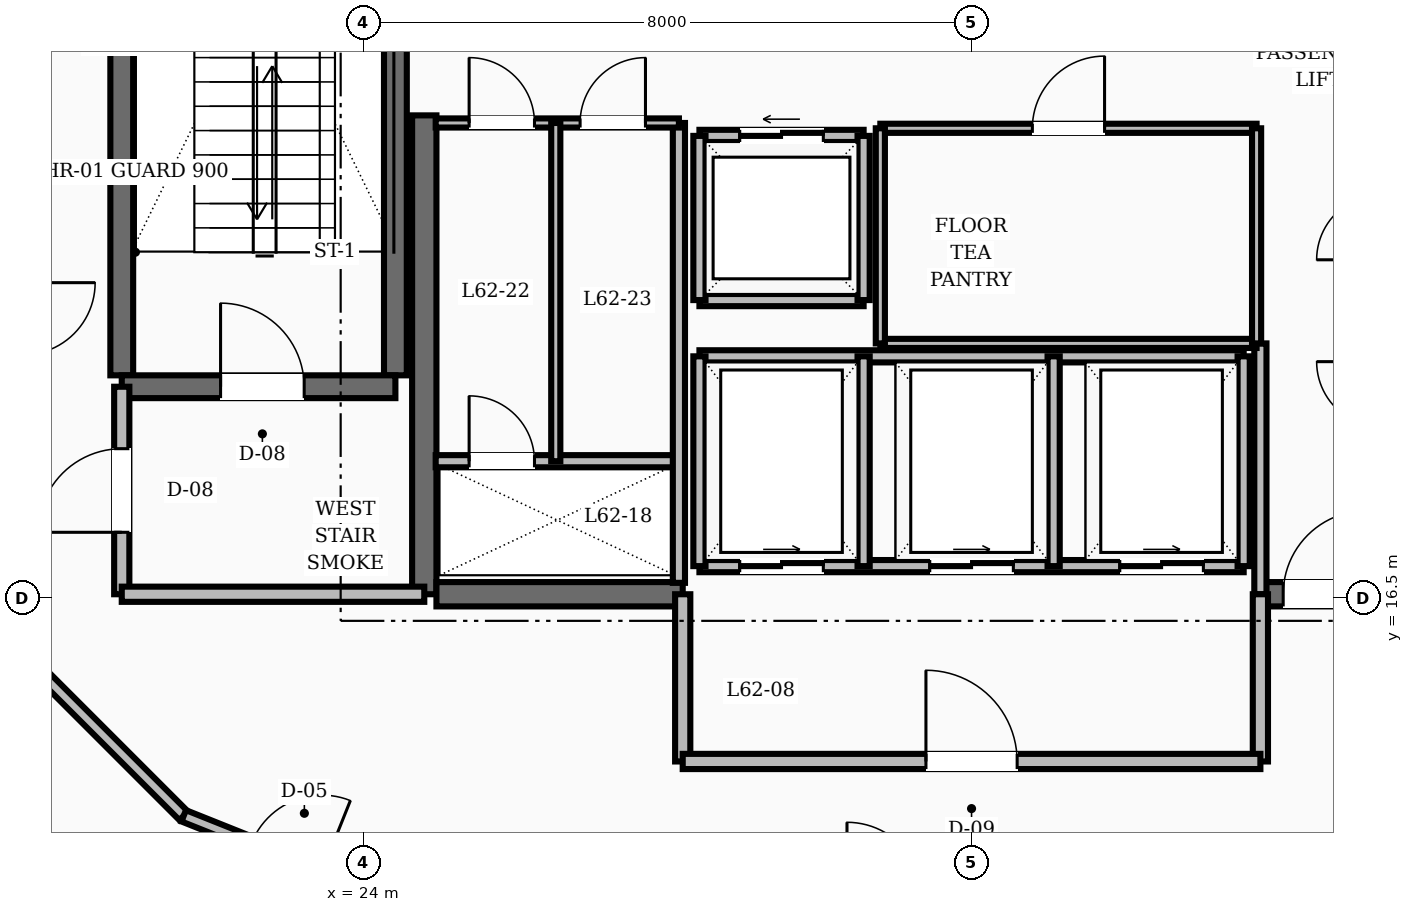
"""IFC4 building model, lengths in metres.
Left out: names, types, materials, properties, quantities, classifications, styles, units other than length and angle.
Written with IfcOpenShell. Run it as: python <this file> out.ifc"""

import sys

from ifc_helpers import new_model, si_unit, direction, frame, frame_2d, origin, place, context, subcontext, project, spatial, rectangle, extrude, element, fill, save


model = new_model("IFC4")
c1 = context("Model", 3, precision=1e-05, world=origin(), true_north=direction((0.0, 1.0)))
c2 = subcontext(c1, "Body", "Model", "MODEL_VIEW")
j1 = project(units=[si_unit("LENGTHUNIT", "METRE"), si_unit("PLANEANGLEUNIT", "RADIAN")], contexts=[c1])
p1 = place(None, origin())
s1 = spatial("IfcSite", under=j1, at=p1, CompositionType="ELEMENT")
p2 = place(p1, origin())
s2 = spatial("IfcBuilding", under=s1, at=p2, CompositionType="ELEMENT")
p3 = place(p2, frame((0.0, 0.0, 240.0)))
s3 = spatial("IfcBuildingStorey", under=s2, at=p3, CompositionType="ELEMENT", Elevation=240.0)
p4 = place(p3, frame((24.8, 16.55, 0.0), z_axis=(0.0, 0.0, 1.0), x_axis=(0.0, 1.0, 0.0)))
e1 = element("IfcWall", 1, at=p4, inside=s3, PredefinedType="SHEAR", context=c2, shape_type="SweptSolid", body=[
    extrude(rectangle(XDim=6.3, YDim=0.32, at=frame_2d((3.15, 0.0))), origin(), (0.0, 0.0, 1.0), 3.6),
])
p5 = place(p3, frame((24.96, 16.55, 0.0), z_axis=(0.0, 0.0, 1.0), x_axis=(1.0, 0.0, 0.0)))
e2 = element("IfcWall", 2, at=p5, inside=s3, PredefinedType="SHEAR", context=c2, shape_type="SweptSolid", body=[
    extrude(rectangle(XDim=3.24, YDim=0.32, at=frame_2d((1.62, 0.0))), origin(), (0.0, 0.0, 1.0), 3.6),
])
p6 = place(p3, frame((35.8, 16.55, 0.0), z_axis=(0.0, 0.0, 1.0), x_axis=(1.0, 0.0, 0.0)))
e3 = element("IfcWall", 3, at=p6, inside=s3, PredefinedType="SHEAR", context=c2, shape_type="SweptSolid", body=[
    extrude(rectangle(XDim=3.24, YDim=0.32, at=frame_2d((1.62, 0.0))), origin(), (0.0, 0.0, 1.0), 3.6),
])
p7 = place(p6, frame((0.3, 0.0, 0.0)))
e4 = element("IfcOpeningElement", 4, at=p7, cuts=e3, PredefinedType="OPENING", context=c2, shape_type="SweptSolid", body=[
    extrude(rectangle(XDim=1.1, YDim=2.1, at=frame_2d((0.55, 1.05))), frame((0.0, 0.17, 0.0), z_axis=(0.0, -1.0, 0.0), x_axis=(1.0, 0.0, 0.0)), (0.0, 0.0, 1.0), 0.34),
])
for number, where, z_axis, x_axis in (
    (5, (20.82, 19.43, 0.0), (0.0, 0.0, 1.0), (0.0, 1.0, 0.0)),
    (6, (24.42, 19.43, 0.0), (0.0, 0.0, 1.0), (0.0, 1.0, 0.0)),
):
    element("IfcWall", number, at=place(p3, frame(where, z_axis=z_axis, x_axis=x_axis)), inside=s3, PredefinedType="SHEAR", context=c2, shape_type="SweptSolid", body=[
        extrude(rectangle(XDim=8.74, YDim=0.3, at=frame_2d((4.37, 0.0))), origin(), (0.0, 0.0, 1.0), 3.6),
    ])
p8 = place(p3, frame((20.82, 19.28, 0.0), z_axis=(0.0, 0.0, 1.0), x_axis=(1.0, 0.0, 0.0)))
e7 = element("IfcWall", 7, at=p8, inside=s3, PredefinedType="SHEAR", context=c2, shape_type="SweptSolid", body=[
    extrude(rectangle(XDim=3.6, YDim=0.3, at=frame_2d((1.8, 0.0))), origin(), (0.0, 0.0, 1.0), 3.6),
])
p9 = place(p8, frame((1.3, 0.0, 0.0)))
e8 = element("IfcOpeningElement", 8, at=p9, cuts=e7, PredefinedType="OPENING", context=c2, shape_type="SweptSolid", body=[
    extrude(rectangle(XDim=1.1, YDim=2.1, at=frame_2d((0.55, 1.05))), frame((0.0, 0.16, 0.0), z_axis=(0.0, -1.0, 0.0), x_axis=(1.0, 0.0, 0.0)), (0.0, 0.0, 1.0), 0.32),
])
p10 = place(p3, frame((20.82, 16.55, 0.0), z_axis=(0.0, 0.0, 1.0), x_axis=(0.0, 1.0, 0.0)))
e9 = element("IfcWall", 9, at=p10, inside=s3, PredefinedType="SOLIDWALL", context=c2, shape_type="SweptSolid", body=[
    extrude(rectangle(XDim=2.73, YDim=0.2, at=frame_2d((1.365, 0.0))), origin(), (0.0, 0.0, 1.0), 2.87),
])
p11 = place(p10, frame((0.815, 0.0, 0.0)))
e10 = element("IfcOpeningElement", 10, at=p11, cuts=e9, PredefinedType="OPENING", context=c2, shape_type="SweptSolid", body=[
    extrude(rectangle(XDim=1.1, YDim=2.1, at=frame_2d((0.55, 1.05))), frame((0.0, 0.11, 0.0), z_axis=(0.0, -1.0, 0.0), x_axis=(1.0, 0.0, 0.0)), (0.0, 0.0, 1.0), 0.22),
])
p12 = place(p3, frame((20.82, 16.55, 0.0), z_axis=(0.0, 0.0, 1.0), x_axis=(1.0, 0.0, 0.0)))
e11 = element("IfcWall", 11, at=p12, inside=s3, PredefinedType="SOLIDWALL", context=c2, shape_type="SweptSolid", body=[
    extrude(rectangle(XDim=3.98, YDim=0.2, at=frame_2d((1.99, 0.0))), origin(), (0.0, 0.0, 1.0), 2.87),
])
p13 = place(p3, frame((35.8, 16.55, 0.0), z_axis=(0.0, 0.0, 1.0), x_axis=(0.0, 1.0, 0.0)))
e12 = element("IfcWall", 12, at=p13, inside=s3, PredefinedType="SOLIDWALL", context=c2, shape_type="SweptSolid", body=[
    extrude(rectangle(XDim=3.3, YDim=0.16, at=frame_2d((1.65, 0.0))), origin(), (0.0, 0.0, 1.0), 2.87),
])
for number, where, z_axis, x_axis in (
    (13, (28.2, 14.35, 0.0), (0.0, 0.0, 1.0), (0.0, 1.0, 0.0)),
    (14, (35.8, 14.35, 0.0), (0.0, 0.0, 1.0), (0.0, 1.0, 0.0)),
):
    element("IfcWall", number, at=place(p3, frame(where, z_axis=z_axis, x_axis=x_axis)), inside=s3, PredefinedType="SOLIDWALL", context=c2, shape_type="SweptSolid", body=[
        extrude(rectangle(XDim=2.2, YDim=0.2, at=frame_2d((1.1, 0.0))), origin(), (0.0, 0.0, 1.0), 2.87),
    ])
p14 = place(p3, frame((28.2, 14.35, 0.0), z_axis=(0.0, 0.0, 1.0), x_axis=(1.0, 0.0, 0.0)))
e15 = element("IfcWall", 15, at=p14, inside=s3, PredefinedType="SOLIDWALL", context=c2, shape_type="SweptSolid", body=[
    extrude(rectangle(XDim=7.6, YDim=0.2, at=frame_2d((3.8, 0.0))), origin(), (0.0, 0.0, 1.0), 2.87),
])
p15 = place(p14, frame((3.2, 0.0, 0.0)))
e16 = element("IfcOpeningElement", 16, at=p15, cuts=e15, PredefinedType="OPENING", context=c2, shape_type="SweptSolid", body=[
    extrude(rectangle(XDim=1.2, YDim=2.1, at=frame_2d((0.6, 1.05))), frame((0.0, 0.11, 0.0), z_axis=(0.0, -1.0, 0.0), x_axis=(1.0, 0.0, 0.0)), (0.0, 0.0, 1.0), 0.22),
])
p16 = place(p3, frame((28.42, 22.58, 0.0), z_axis=(0.0, 0.0, 1.0), x_axis=(1.0, 0.0, 0.0)))
e17 = element("IfcWall", 17, at=p16, inside=s3, PredefinedType="SOLIDWALL", context=c2, shape_type="SweptSolid", body=[
    extrude(rectangle(XDim=2.16, YDim=0.16, at=frame_2d((1.08, 0.0))), origin(), (0.0, 0.0, 1.0), 2.87),
])
p17 = place(p16, frame((0.53, 0.0, 0.0)))
e18 = element("IfcOpeningElement", 18, at=p17, cuts=e17, PredefinedType="OPENING", context=c2, shape_type="SweptSolid", body=[
    extrude(rectangle(XDim=1.1, YDim=2.15, at=frame_2d((0.55, 1.075))), frame((0.0, 0.09, 0.0), z_axis=(0.0, -1.0, 0.0), x_axis=(1.0, 0.0, 0.0)), (0.0, 0.0, 1.0), 0.18),
])
for number, where, z_axis, x_axis in (
    (19, (28.42, 20.42, 0.0), (0.0, 0.0, 1.0), (1.0, 0.0, 0.0)),
    (20, (28.42, 20.42, 0.0), (0.0, 0.0, 1.0), (0.0, 1.0, 0.0)),
    (21, (30.58, 20.42, 0.0), (0.0, 0.0, 1.0), (0.0, 1.0, 0.0)),
):
    element("IfcWall", number, at=place(p3, frame(where, z_axis=z_axis, x_axis=x_axis)), inside=s3, PredefinedType="SOLIDWALL", context=c2, shape_type="SweptSolid", body=[
        extrude(rectangle(XDim=2.16, YDim=0.16, at=frame_2d((1.08, 0.0))), origin(), (0.0, 0.0, 1.0), 2.87),
    ])
p18 = place(p3, frame((28.42, 16.92, 0.0), z_axis=(0.0, 0.0, 1.0), x_axis=(1.0, 0.0, 0.0)))
e22 = element("IfcWall", 22, at=p18, inside=s3, PredefinedType="SOLIDWALL", context=c2, shape_type="SweptSolid", body=[
    extrude(rectangle(XDim=7.16, YDim=0.16, at=frame_2d((3.58, 0.0))), origin(), (0.0, 0.0, 1.0), 2.87),
])
p19 = place(p18, frame((0.53, 0.0, 0.0)))
e23 = element("IfcOpeningElement", 23, at=p19, cuts=e22, PredefinedType="OPENING", context=c2, shape_type="SweptSolid", body=[
    extrude(rectangle(XDim=1.1, YDim=2.15, at=frame_2d((0.55, 1.075))), frame((0.0, 0.09, 0.0), z_axis=(0.0, -1.0, 0.0), x_axis=(1.0, 0.0, 0.0)), (0.0, 0.0, 1.0), 0.18),
])
p20 = place(p18, frame((3.03, 0.0, 0.0)))
e24 = element("IfcOpeningElement", 24, at=p20, cuts=e22, PredefinedType="OPENING", context=c2, shape_type="SweptSolid", body=[
    extrude(rectangle(XDim=1.1, YDim=2.15, at=frame_2d((0.55, 1.075))), frame((0.0, 0.09, 0.0), z_axis=(0.0, -1.0, 0.0), x_axis=(1.0, 0.0, 0.0)), (0.0, 0.0, 1.0), 0.18),
])
p21 = place(p18, frame((5.53, 0.0, 0.0)))
e25 = element("IfcOpeningElement", 25, at=p21, cuts=e22, PredefinedType="OPENING", context=c2, shape_type="SweptSolid", body=[
    extrude(rectangle(XDim=1.1, YDim=2.15, at=frame_2d((0.55, 1.075))), frame((0.0, 0.09, 0.0), z_axis=(0.0, -1.0, 0.0), x_axis=(1.0, 0.0, 0.0)), (0.0, 0.0, 1.0), 0.18),
])
p22 = place(p3, frame((28.42, 19.68, 0.0), z_axis=(0.0, 0.0, 1.0), x_axis=(1.0, 0.0, 0.0)))
e26 = element("IfcWall", 26, at=p22, inside=s3, PredefinedType="SOLIDWALL", context=c2, shape_type="SweptSolid", body=[
    extrude(rectangle(XDim=7.16, YDim=0.16, at=frame_2d((3.58, 0.0))), origin(), (0.0, 0.0, 1.0), 2.87),
])
for number, where, z_axis, x_axis in (
    (27, (28.42, 16.92, 0.0), (0.0, 0.0, 1.0), (0.0, 1.0, 0.0)),
    (28, (30.58, 16.92, 0.0), (0.0, 0.0, 1.0), (0.0, 1.0, 0.0)),
    (29, (33.08, 16.92, 0.0), (0.0, 0.0, 1.0), (0.0, 1.0, 0.0)),
    (30, (35.58, 16.92, 0.0), (0.0, 0.0, 1.0), (0.0, 1.0, 0.0)),
):
    element("IfcWall", number, at=place(p3, frame(where, z_axis=z_axis, x_axis=x_axis)), inside=s3, PredefinedType="SOLIDWALL", context=c2, shape_type="SweptSolid", body=[
        extrude(rectangle(XDim=2.76, YDim=0.16, at=frame_2d((1.38, 0.0))), origin(), (0.0, 0.0, 1.0), 2.87),
    ])
p23 = place(p3, frame((30.8, 22.68, 0.0), z_axis=(0.0, 0.0, 1.0), x_axis=(1.0, 0.0, 0.0)))
e31 = element("IfcWall", 31, at=p23, inside=s3, PredefinedType="PARTITIONING", context=c2, shape_type="SweptSolid", body=[
    extrude(rectangle(XDim=4.95, YDim=0.12, at=frame_2d((2.475, 0.0))), origin(), (0.0, 0.0, 1.0), 2.87),
])
p24 = place(p23, frame((2.0, 0.0, 0.0)))
e32 = element("IfcOpeningElement", 32, at=p24, cuts=e31, PredefinedType="OPENING", context=c2, shape_type="SweptSolid", body=[
    extrude(rectangle(XDim=0.95, YDim=2.1, at=frame_2d((0.475, 1.05))), frame((0.0, 0.07, 0.0), z_axis=(0.0, -1.0, 0.0), x_axis=(1.0, 0.0, 0.0)), (0.0, 0.0, 1.0), 0.14),
])
p25 = place(p3, frame((30.8, 19.85, 0.0), z_axis=(0.0, 0.0, 1.0), x_axis=(1.0, 0.0, 0.0)))
e33 = element("IfcWall", 33, at=p25, inside=s3, PredefinedType="PARTITIONING", context=c2, shape_type="SweptSolid", body=[
    extrude(rectangle(XDim=4.95, YDim=0.12, at=frame_2d((2.475, 0.0))), origin(), (0.0, 0.0, 1.0), 2.87),
])
for number, where, z_axis, x_axis in (
    (34, (30.8, 19.85, 0.0), (0.0, 0.0, 1.0), (0.0, 1.0, 0.0)),
    (35, (35.75, 19.85, 0.0), (0.0, 0.0, 1.0), (0.0, 1.0, 0.0)),
):
    element("IfcWall", number, at=place(p3, frame(where, z_axis=z_axis, x_axis=x_axis)), inside=s3, PredefinedType="PARTITIONING", context=c2, shape_type="SweptSolid", body=[
        extrude(rectangle(XDim=2.83, YDim=0.12, at=frame_2d((1.415, 0.0))), origin(), (0.0, 0.0, 1.0), 2.87),
    ])
p26 = place(p3, frame((24.95, 18.3, 0.0), z_axis=(0.0, 0.0, 1.0), x_axis=(1.0, 0.0, 0.0)))
e36 = element("IfcWall", 36, at=p26, inside=s3, PredefinedType="SOLIDWALL", context=c2, shape_type="SweptSolid", body=[
    extrude(rectangle(XDim=3.2, YDim=0.16, at=frame_2d((1.6, 0.0))), origin(), (0.0, 0.0, 1.0), 2.87),
])
p27 = place(p26, frame((0.44, 0.0, 0.0)))
e37 = element("IfcOpeningElement", 37, at=p27, cuts=e36, PredefinedType="OPENING", context=c2, shape_type="SweptSolid", body=[
    extrude(rectangle(XDim=0.86, YDim=2.05, at=frame_2d((0.43, 1.025))), frame((0.0, 0.09, 0.0), z_axis=(0.0, -1.0, 0.0), x_axis=(1.0, 0.0, 0.0)), (0.0, 0.0, 1.0), 0.18),
])
p28 = place(p3, frame((28.15, 16.7, 0.0), z_axis=(0.0, 0.0, 1.0), x_axis=(0.0, 1.0, 0.0)))
e38 = element("IfcWall", 38, at=p28, inside=s3, PredefinedType="SOLIDWALL", context=c2, shape_type="SweptSolid", body=[
    extrude(rectangle(XDim=6.05, YDim=0.16, at=frame_2d((3.025, 0.0))), origin(), (0.0, 0.0, 1.0), 2.87),
])
p29 = place(p3, frame((24.95, 22.75, 0.0), z_axis=(0.0, 0.0, 1.0), x_axis=(1.0, 0.0, 0.0)))
e39 = element("IfcWall", 39, at=p29, inside=s3, PredefinedType="PARTITIONING", context=c2, shape_type="SweptSolid", body=[
    extrude(rectangle(XDim=3.2, YDim=0.12, at=frame_2d((1.6, 0.0))), origin(), (0.0, 0.0, 1.0), 2.87),
])
p30 = place(p29, frame((0.44, 0.0, 0.0)))
e40 = element("IfcOpeningElement", 40, at=p30, cuts=e39, PredefinedType="OPENING", context=c2, shape_type="SweptSolid", body=[
    extrude(rectangle(XDim=0.86, YDim=2.1, at=frame_2d((0.43, 1.05))), frame((0.0, 0.07, 0.0), z_axis=(0.0, -1.0, 0.0), x_axis=(1.0, 0.0, 0.0)), (0.0, 0.0, 1.0), 0.14),
])
p31 = place(p29, frame((1.9, 0.0, 0.0)))
e41 = element("IfcOpeningElement", 41, at=p31, cuts=e39, PredefinedType="OPENING", context=c2, shape_type="SweptSolid", body=[
    extrude(rectangle(XDim=0.86, YDim=2.1, at=frame_2d((0.43, 1.05))), frame((0.0, 0.07, 0.0), z_axis=(0.0, -1.0, 0.0), x_axis=(1.0, 0.0, 0.0)), (0.0, 0.0, 1.0), 0.14),
])
p32 = place(p3, frame((26.53, 18.3, 0.0), z_axis=(0.0, 0.0, 1.0), x_axis=(0.0, 1.0, 0.0)))
e42 = element("IfcWall", 42, at=p32, inside=s3, PredefinedType="PARTITIONING", context=c2, shape_type="SweptSolid", body=[
    extrude(rectangle(XDim=4.45, YDim=0.12, at=frame_2d((2.225, 0.0))), origin(), (0.0, 0.0, 1.0), 2.87),
])
p33 = place(p3, frame((19.573, 15.697, 0.0), z_axis=(0.0, 0.0, 1.0), x_axis=(0.707106781187, -0.707106781187, 0.0)))
e43 = element("IfcWall", 43, at=p33, inside=s3, PredefinedType="SOLIDWALL", context=c2, shape_type="SweptSolid", body=[
    extrude(rectangle(XDim=2.916, YDim=0.16, at=frame_2d((1.458, 0.0))), origin(), (0.0, 0.0, 1.0), 2.87),
])
p34 = place(p3, frame((21.635, 13.635, 0.0), z_axis=(0.0, 0.0, 1.0), x_axis=(0.92856882165, -0.371160266542, 0.0)))
e44 = element("IfcWall", 44, at=p34, inside=s3, PredefinedType="SOLIDWALL", context=c2, shape_type="SweptSolid", body=[
    extrude(rectangle(XDim=2.923, YDim=0.16, at=frame_2d((1.461, 0.0))), origin(), (0.0, 0.0, 1.0), 2.87),
])
p35 = place(p34, frame((0.962, 0.0, 0.0)))
e45 = element("IfcOpeningElement", 45, at=p35, cuts=e44, PredefinedType="OPENING", context=c2, shape_type="SweptSolid", body=[
    extrude(rectangle(XDim=1.0, YDim=2.1, at=frame_2d((0.5, 1.05))), frame((0.0, 0.09, 0.0), z_axis=(0.0, -1.0, 0.0), x_axis=(1.0, 0.0, 0.0)), (0.0, 0.0, 1.0), 0.18),
])
p36 = place(p9, origin())
e46 = element("IfcDoor", 46, at=p36, inside=s3, OperationType="SINGLE_SWING_LEFT", PredefinedType="DOOR", context=c2, shape_type="SweptSolid", body=[
    extrude(rectangle(XDim=1.1, YDim=2.1, at=frame_2d((0.55, 1.05))), frame((0.0, 0.025, 0.0), z_axis=(0.0, -1.0, 0.0), x_axis=(1.0, 0.0, 0.0)), (0.0, 0.0, 1.0), 0.05),
])
fill(e8, e46)
p37 = place(p11, origin())
e47 = element("IfcDoor", 47, at=p37, inside=s3, OperationType="SINGLE_SWING_LEFT", PredefinedType="DOOR", context=c2, shape_type="SweptSolid", body=[
    extrude(rectangle(XDim=1.1, YDim=2.1, at=frame_2d((0.55, 1.05))), frame((0.0, 0.025, 0.0), z_axis=(0.0, -1.0, 0.0), x_axis=(1.0, 0.0, 0.0)), (0.0, 0.0, 1.0), 0.05),
])
fill(e10, e47)
p38 = place(p7, origin())
e48 = element("IfcDoor", 48, at=p38, inside=s3, OperationType="SINGLE_SWING_RIGHT", PredefinedType="DOOR", context=c2, shape_type="SweptSolid", body=[
    extrude(rectangle(XDim=1.1, YDim=2.1, at=frame_2d((0.55, 1.05))), frame((0.0, 0.025, 0.0), z_axis=(0.0, -1.0, 0.0), x_axis=(1.0, 0.0, 0.0)), (0.0, 0.0, 1.0), 0.05),
])
fill(e4, e48)
p39 = place(p15, origin())
e49 = element("IfcDoor", 49, at=p39, inside=s3, OperationType="SINGLE_SWING_LEFT", PredefinedType="DOOR", context=c2, shape_type="SweptSolid", body=[
    extrude(rectangle(XDim=1.2, YDim=2.1, at=frame_2d((0.6, 1.05))), frame((0.0, 0.025, 0.0), z_axis=(0.0, -1.0, 0.0), x_axis=(1.0, 0.0, 0.0)), (0.0, 0.0, 1.0), 0.05),
])
fill(e16, e49)
p40 = place(p17, origin())
e50 = element("IfcDoor", 50, at=p40, inside=s3, OperationType="SLIDING_TO_LEFT", PredefinedType="DOOR", context=c2, shape_type="SweptSolid", body=[
    extrude(rectangle(XDim=1.1, YDim=2.15, at=frame_2d((0.55, 1.075))), frame((0.0, 0.025, 0.0), z_axis=(0.0, -1.0, 0.0), x_axis=(1.0, 0.0, 0.0)), (0.0, 0.0, 1.0), 0.05),
])
fill(e18, e50)
p41 = place(p19, origin())
e51 = element("IfcDoor", 51, at=p41, inside=s3, OperationType="SLIDING_TO_RIGHT", PredefinedType="DOOR", context=c2, shape_type="SweptSolid", body=[
    extrude(rectangle(XDim=1.1, YDim=2.15, at=frame_2d((0.55, 1.075))), frame((0.0, 0.025, 0.0), z_axis=(0.0, -1.0, 0.0), x_axis=(1.0, 0.0, 0.0)), (0.0, 0.0, 1.0), 0.05),
])
fill(e23, e51)
p42 = place(p20, origin())
e52 = element("IfcDoor", 52, at=p42, inside=s3, OperationType="SLIDING_TO_RIGHT", PredefinedType="DOOR", context=c2, shape_type="SweptSolid", body=[
    extrude(rectangle(XDim=1.1, YDim=2.15, at=frame_2d((0.55, 1.075))), frame((0.0, 0.025, 0.0), z_axis=(0.0, -1.0, 0.0), x_axis=(1.0, 0.0, 0.0)), (0.0, 0.0, 1.0), 0.05),
])
fill(e24, e52)
p43 = place(p21, origin())
e53 = element("IfcDoor", 53, at=p43, inside=s3, OperationType="SLIDING_TO_RIGHT", PredefinedType="DOOR", context=c2, shape_type="SweptSolid", body=[
    extrude(rectangle(XDim=1.1, YDim=2.15, at=frame_2d((0.55, 1.075))), frame((0.0, 0.025, 0.0), z_axis=(0.0, -1.0, 0.0), x_axis=(1.0, 0.0, 0.0)), (0.0, 0.0, 1.0), 0.05),
])
fill(e25, e53)
p44 = place(p24, origin())
e54 = element("IfcDoor", 54, at=p44, inside=s3, OperationType="SINGLE_SWING_RIGHT", PredefinedType="DOOR", context=c2, shape_type="SweptSolid", body=[
    extrude(rectangle(XDim=0.95, YDim=2.1, at=frame_2d((0.475, 1.05))), frame((0.0, 0.025, 0.0), z_axis=(0.0, -1.0, 0.0), x_axis=(1.0, 0.0, 0.0)), (0.0, 0.0, 1.0), 0.05),
])
fill(e32, e54)
p45 = place(p27, origin())
e55 = element("IfcDoor", 55, at=p45, inside=s3, OperationType="SINGLE_SWING_LEFT", PredefinedType="TRAPDOOR", context=c2, shape_type="SweptSolid", body=[
    extrude(rectangle(XDim=0.86, YDim=2.05, at=frame_2d((0.43, 1.025))), frame((0.0, 0.025, 0.0), z_axis=(0.0, -1.0, 0.0), x_axis=(1.0, 0.0, 0.0)), (0.0, 0.0, 1.0), 0.05),
])
fill(e37, e55)
p46 = place(p30, origin())
e56 = element("IfcDoor", 56, at=p46, inside=s3, OperationType="SINGLE_SWING_LEFT", PredefinedType="DOOR", context=c2, shape_type="SweptSolid", body=[
    extrude(rectangle(XDim=0.86, YDim=2.1, at=frame_2d((0.43, 1.05))), frame((0.0, 0.025, 0.0), z_axis=(0.0, -1.0, 0.0), x_axis=(1.0, 0.0, 0.0)), (0.0, 0.0, 1.0), 0.05),
])
fill(e40, e56)
p47 = place(p31, origin())
e57 = element("IfcDoor", 57, at=p47, inside=s3, OperationType="SINGLE_SWING_RIGHT", PredefinedType="DOOR", context=c2, shape_type="SweptSolid", body=[
    extrude(rectangle(XDim=0.86, YDim=2.1, at=frame_2d((0.43, 1.05))), frame((0.0, 0.025, 0.0), z_axis=(0.0, -1.0, 0.0), x_axis=(1.0, 0.0, 0.0)), (0.0, 0.0, 1.0), 0.05),
])
fill(e41, e57)
save(model, sys.argv[1])
